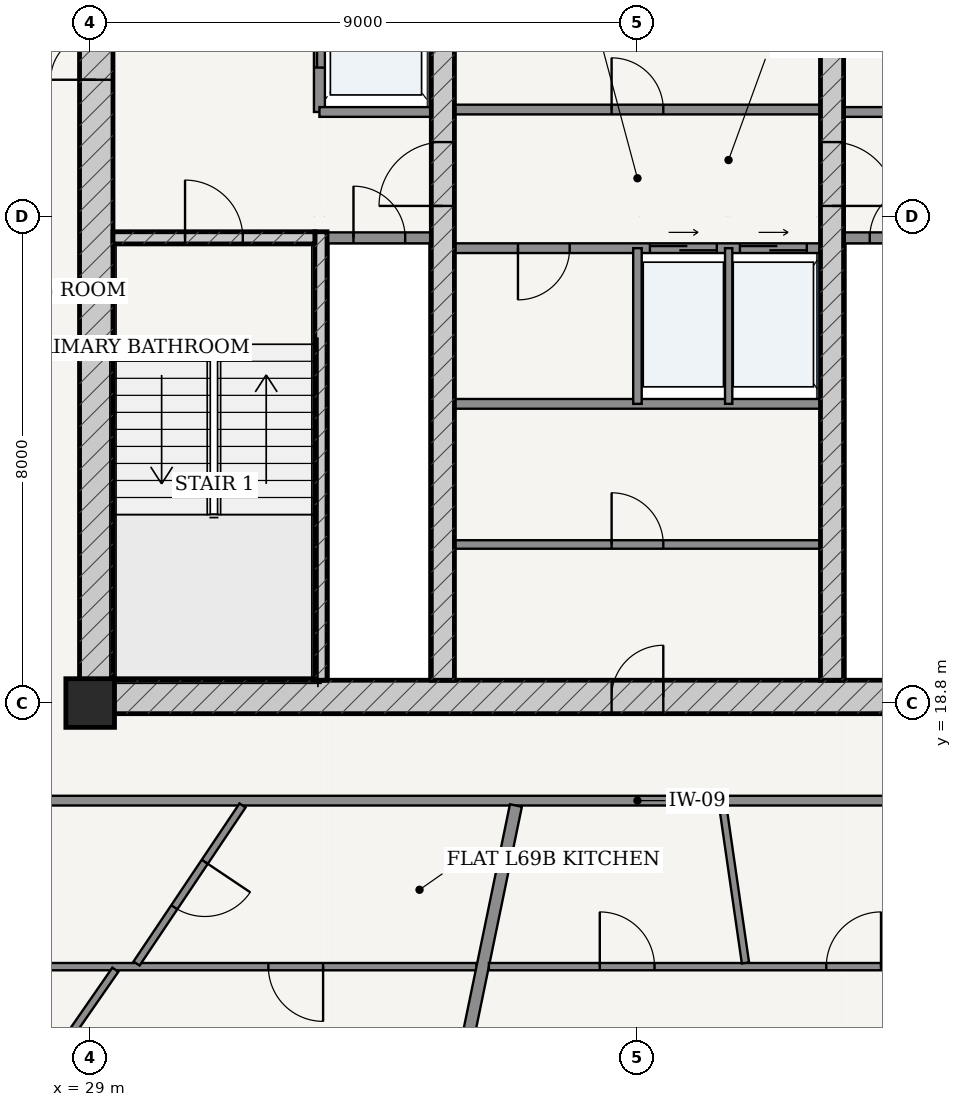
"""IFC4 building model, lengths in metres.
Left out: names, types, materials, properties, quantities, classifications, styles, units other than length and angle.
Written with IfcOpenShell. Run it as: python <this file> out.ifc"""

import sys

from ifc_helpers import new_model, si_unit, direction, frame, frame_2d, origin, origin_2d, place, context, subcontext, project, spatial, rectangle, extrude, source, transform, mapped, element, fill, save


model = new_model("IFC4")
c1 = context("Model", 3, precision=1e-05, world=origin(), true_north=direction((-0.2419218956, 0.970295726276)))
c2 = subcontext(c1, "Body", "Model", "MODEL_VIEW")
j1 = project(units=[si_unit("LENGTHUNIT", "METRE"), si_unit("PLANEANGLEUNIT", "RADIAN")], contexts=[c1])
p1 = place(None, origin())
s1 = spatial("IfcSite", under=j1, at=p1, CompositionType="ELEMENT")
p2 = place(p1, origin())
s2 = spatial("IfcBuilding", under=s1, at=p2, CompositionType="ELEMENT")
p3 = place(p2, frame((0.0, 0.0, 263.2)))
s3 = spatial("IfcBuildingStorey", under=s2, at=p3, CompositionType="ELEMENT", Elevation=263.2)
p4 = place(p3, frame((29.0, 18.8, 0.0), z_axis=(0.0, 0.0, 1.0), x_axis=(1.0, 0.0, 0.0)))
e1 = element("IfcColumn", 1, at=p4, inside=s3, PredefinedType="COLUMN", context=c2, shape_type="SweptSolid", body=[
    extrude(rectangle(XDim=0.8, YDim=0.8, at=origin_2d()), origin(), (0.0, 0.0, 1.0), 3.75),
])
p5 = place(p3, frame((28.825, 18.9, 0.0), z_axis=(0.0, 0.0, 1.0), x_axis=(1.0, 0.0, 0.0)))
e2 = element("IfcWall", 2, at=p5, inside=s3, PredefinedType="SHEAR", context=c2, shape_type="SweptSolid", body=[
    extrude(rectangle(XDim=18.35, YDim=0.55, at=frame_2d((9.175, 0.0))), origin(), (0.0, 0.0, 1.0), 3.49),
])
p6 = place(p5, frame((8.75, 0.0, 0.0)))
e3 = element("IfcOpeningElement", 3, at=p6, cuts=e2, PredefinedType="OPENING", context=c2, shape_type="SweptSolid", body=[
    extrude(rectangle(XDim=0.85, YDim=2.1, at=frame_2d((0.425, 1.05))), frame((0.0, 0.285, 0.0), z_axis=(0.0, -1.0, 0.0), x_axis=(1.0, 0.0, 0.0)), (0.0, 0.0, 1.0), 0.57),
])
p7 = place(p3, frame((29.1, 19.175, 0.0), z_axis=(0.0, 0.0, 1.0), x_axis=(0.0, 1.0, 0.0)))
e4 = element("IfcWall", 4, at=p7, inside=s3, PredefinedType="SHEAR", context=c2, shape_type="SweptSolid", body=[
    extrude(rectangle(XDim=15.25, YDim=0.55, at=frame_2d((7.625, 0.0))), origin(), (0.0, 0.0, 1.0), 3.49),
])
p8 = place(p7, frame((9.875, 0.0, 0.0)))
e5 = element("IfcOpeningElement", 5, at=p8, cuts=e4, PredefinedType="OPENING", context=c2, shape_type="SweptSolid", body=[
    extrude(rectangle(XDim=1.5, YDim=2.2, at=frame_2d((0.75, 1.1))), frame((0.0, 0.285, 0.0), z_axis=(0.0, -1.0, 0.0), x_axis=(1.0, 0.0, 0.0)), (0.0, 0.0, 1.0), 0.57),
])
p9 = place(p3, frame((32.795, 19.175, 0.0), z_axis=(0.0, 0.0, 1.0), x_axis=(0.0, 1.0, 0.0)))
e6 = element("IfcWall", 6, at=p9, inside=s3, PredefinedType="SOLIDWALL", context=c2, shape_type="SweptSolid", body=[
    extrude(rectangle(XDim=7.375, YDim=0.2, at=frame_2d((3.688, 0.0))), origin(), (0.0, 0.0, 1.0), 3.49),
])
p10 = place(p3, frame((29.375, 26.45, 0.0), z_axis=(0.0, 0.0, 1.0), x_axis=(1.0, 0.0, 0.0)))
e7 = element("IfcWall", 7, at=p10, inside=s3, PredefinedType="SOLIDWALL", context=c2, shape_type="SweptSolid", body=[
    extrude(rectangle(XDim=3.32, YDim=0.2, at=frame_2d((1.66, 0.0))), origin(), (0.0, 0.0, 1.0), 3.49),
])
p11 = place(p10, frame((1.185, 0.0, 0.0)))
e8 = element("IfcOpeningElement", 8, at=p11, cuts=e7, PredefinedType="OPENING", context=c2, shape_type="SweptSolid", body=[
    extrude(rectangle(XDim=0.95, YDim=2.15, at=frame_2d((0.475, 1.075))), frame((0.0, 0.11, 0.0), z_axis=(0.0, -1.0, 0.0), x_axis=(1.0, 0.0, 0.0)), (0.0, 0.0, 1.0), 0.22),
])
p12 = place(p3, frame((34.8, 19.175, 0.0), z_axis=(0.0, 0.0, 1.0), x_axis=(0.0, 1.0, 0.0)))
e9 = element("IfcWall", 9, at=p12, inside=s3, PredefinedType="SHEAR", context=c2, shape_type="SweptSolid", body=[
    extrude(rectangle(XDim=15.25, YDim=0.38, at=frame_2d((7.625, 0.0))), origin(), (0.0, 0.0, 1.0), 3.49),
])
p13 = place(p12, frame((7.8, 0.0, 0.0)))
e10 = element("IfcOpeningElement", 10, at=p13, cuts=e9, PredefinedType="OPENING", context=c2, shape_type="SweptSolid", body=[
    extrude(rectangle(XDim=1.05, YDim=2.15, at=frame_2d((0.525, 1.075))), frame((0.0, 0.2, 0.0), z_axis=(0.0, -1.0, 0.0), x_axis=(1.0, 0.0, 0.0)), (0.0, 0.0, 1.0), 0.4),
])
p14 = place(p3, frame((41.2, 19.175, 0.0), z_axis=(0.0, 0.0, 1.0), x_axis=(0.0, 1.0, 0.0)))
e11 = element("IfcWall", 11, at=p14, inside=s3, PredefinedType="SHEAR", context=c2, shape_type="SweptSolid", body=[
    extrude(rectangle(XDim=15.25, YDim=0.38, at=frame_2d((7.625, 0.0))), origin(), (0.0, 0.0, 1.0), 3.49),
])
p15 = place(p14, frame((7.8, 0.0, 0.0)))
e12 = element("IfcOpeningElement", 12, at=p15, cuts=e11, PredefinedType="OPENING", context=c2, shape_type="SweptSolid", body=[
    extrude(rectangle(XDim=1.05, YDim=2.15, at=frame_2d((0.525, 1.075))), frame((0.0, 0.2, 0.0), z_axis=(0.0, -1.0, 0.0), x_axis=(1.0, 0.0, 0.0)), (0.0, 0.0, 1.0), 0.4),
])
p16 = place(p3, frame((32.9, 26.45, 0.0), z_axis=(0.0, 0.0, 1.0), x_axis=(1.0, 0.0, 0.0)))
e13 = element("IfcWall", 13, at=p16, inside=s3, PredefinedType="PARTITIONING", context=c2, shape_type="SweptSolid", body=[
    extrude(rectangle(XDim=1.71, YDim=0.18, at=frame_2d((0.855, 0.0))), origin(), (0.0, 0.0, 1.0), 3.49),
])
p17 = place(p16, frame((0.43, 0.0, 0.0)))
e14 = element("IfcOpeningElement", 14, at=p17, cuts=e13, PredefinedType="OPENING", context=c2, shape_type="SweptSolid", body=[
    extrude(rectangle(XDim=0.85, YDim=2.1, at=frame_2d((0.425, 1.05))), frame((0.0, 0.1, 0.0), z_axis=(0.0, -1.0, 0.0), x_axis=(1.0, 0.0, 0.0)), (0.0, 0.0, 1.0), 0.2),
])
p18 = place(p3, frame((41.39, 26.45, 0.0), z_axis=(0.0, 0.0, 1.0), x_axis=(1.0, 0.0, 0.0)))
e15 = element("IfcWall", 15, at=p18, inside=s3, PredefinedType="PARTITIONING", context=c2, shape_type="SweptSolid", body=[
    extrude(rectangle(XDim=1.71, YDim=0.18, at=frame_2d((0.855, 0.0))), origin(), (0.0, 0.0, 1.0), 3.49),
])
p19 = place(p18, frame((0.43, 0.0, 0.0)))
e16 = element("IfcOpeningElement", 16, at=p19, cuts=e15, PredefinedType="OPENING", context=c2, shape_type="SweptSolid", body=[
    extrude(rectangle(XDim=0.85, YDim=2.1, at=frame_2d((0.425, 1.05))), frame((0.0, 0.1, 0.0), z_axis=(0.0, -1.0, 0.0), x_axis=(1.0, 0.0, 0.0)), (0.0, 0.0, 1.0), 0.2),
])
p20 = place(p3, frame((32.77, 28.52, 0.0), z_axis=(0.0, 0.0, 1.0), x_axis=(0.0, 1.0, 0.0)))
e17 = element("IfcWall", 17, at=p20, inside=s3, PredefinedType="PARTITIONING", context=c2, shape_type="SweptSolid", body=[
    extrude(rectangle(XDim=5.905, YDim=0.18, at=frame_2d((2.953, 0.0))), origin(), (0.0, 0.0, 1.0), 3.49),
])
p21 = place(p20, frame((3.655, 0.0, 0.0)))
e18 = element("IfcOpeningElement", 18, at=p21, cuts=e17, PredefinedType="OPENING", context=c2, shape_type="SweptSolid", body=[
    extrude(rectangle(XDim=1.15, YDim=2.2, at=frame_2d((0.575, 1.1))), frame((0.0, 0.1, 0.0), z_axis=(0.0, -1.0, 0.0), x_axis=(1.0, 0.0, 0.0)), (0.0, 0.0, 1.0), 0.2),
])
p22 = place(p20, frame((0.73, 0.0, 0.0)))
e19 = element("IfcOpeningElement", 19, at=p22, cuts=e17, PredefinedType="OPENING", context=c2, shape_type="SweptSolid", body=[
    extrude(rectangle(XDim=1.2, YDim=2.25, at=frame_2d((0.6, 1.125))), frame((0.0, 0.1, 0.0), z_axis=(0.0, -1.0, 0.0), x_axis=(1.0, 0.0, 0.0)), (0.0, 0.0, 1.0), 0.2),
])
for number, where, z_axis, x_axis in (
    (20, (32.77, 28.52, 0.0), (0.0, 0.0, 1.0), (1.0, 0.0, 0.0)),
    (21, (41.39, 28.52, 0.0), (0.0, 0.0, 1.0), (1.0, 0.0, 0.0)),
):
    element("IfcWall", number, at=place(p3, frame(where, z_axis=z_axis, x_axis=x_axis)), inside=s3, PredefinedType="PARTITIONING", context=c2, shape_type="SweptSolid", body=[
        extrude(rectangle(XDim=1.84, YDim=0.16, at=frame_2d((0.92, 0.0))), origin(), (0.0, 0.0, 1.0), 3.49),
    ])
p23 = place(p3, frame((34.99, 28.56, 0.0), z_axis=(0.0, 0.0, 1.0), x_axis=(1.0, 0.0, 0.0)))
e22 = element("IfcWall", 22, at=p23, inside=s3, PredefinedType="PARTITIONING", context=c2, shape_type="SweptSolid", body=[
    extrude(rectangle(XDim=6.02, YDim=0.16, at=frame_2d((3.01, 0.0))), origin(), (0.0, 0.0, 1.0), 3.49),
])
p24 = place(p23, frame((2.585, 0.0, 0.0)))
e23 = element("IfcOpeningElement", 23, at=p24, cuts=e22, PredefinedType="OPENING", context=c2, shape_type="SweptSolid", body=[
    extrude(rectangle(XDim=0.85, YDim=2.1, at=frame_2d((0.425, 1.05))), frame((0.0, 0.09, 0.0), z_axis=(0.0, -1.0, 0.0), x_axis=(1.0, 0.0, 0.0)), (0.0, 0.0, 1.0), 0.18),
])
p25 = place(p3, frame((34.99, 26.28, 0.0), z_axis=(0.0, 0.0, 1.0), x_axis=(1.0, 0.0, 0.0)))
e24 = element("IfcWall", 24, at=p25, inside=s3, PredefinedType="PARTITIONING", context=c2, shape_type="SweptSolid", body=[
    extrude(rectangle(XDim=6.02, YDim=0.16, at=frame_2d((3.01, 0.0))), origin(), (0.0, 0.0, 1.0), 3.49),
])
p26 = place(p25, frame((1.045, 0.0, 0.0)))
e25 = element("IfcOpeningElement", 25, at=p26, cuts=e24, PredefinedType="OPENING", context=c2, shape_type="SweptSolid", body=[
    extrude(rectangle(XDim=0.85, YDim=2.1, at=frame_2d((0.425, 1.05))), frame((0.0, 0.09, 0.0), z_axis=(0.0, -1.0, 0.0), x_axis=(1.0, 0.0, 0.0)), (0.0, 0.0, 1.0), 0.18),
])
p27 = place(p25, frame((3.215, 0.0, 0.0)))
e26 = element("IfcOpeningElement", 26, at=p27, cuts=e24, PredefinedType="OPENING", context=c2, shape_type="SweptSolid", body=[
    extrude(rectangle(XDim=1.1, YDim=2.2, at=frame_2d((0.55, 1.1))), frame((0.0, 0.09, 0.0), z_axis=(0.0, -1.0, 0.0), x_axis=(1.0, 0.0, 0.0)), (0.0, 0.0, 1.0), 0.18),
])
p28 = place(p25, frame((4.695, 0.0, 0.0)))
e27 = element("IfcOpeningElement", 27, at=p28, cuts=e24, PredefinedType="OPENING", context=c2, shape_type="SweptSolid", body=[
    extrude(rectangle(XDim=1.1, YDim=2.2, at=frame_2d((0.55, 1.1))), frame((0.0, 0.09, 0.0), z_axis=(0.0, -1.0, 0.0), x_axis=(1.0, 0.0, 0.0)), (0.0, 0.0, 1.0), 0.18),
])
p29 = place(p3, frame((34.99, 23.72, 0.0), z_axis=(0.0, 0.0, 1.0), x_axis=(1.0, 0.0, 0.0)))
e28 = element("IfcWall", 28, at=p29, inside=s3, PredefinedType="PARTITIONING", context=c2, shape_type="SweptSolid", body=[
    extrude(rectangle(XDim=6.02, YDim=0.16, at=frame_2d((3.01, 0.0))), origin(), (0.0, 0.0, 1.0), 3.49),
])
p30 = place(p3, frame((38.0, 23.72, 0.0), z_axis=(0.0, 0.0, 1.0), x_axis=(0.0, 1.0, 0.0)))
e29 = element("IfcWall", 29, at=p30, inside=s3, PredefinedType="PARTITIONING", context=c2, shape_type="SweptSolid", body=[
    extrude(rectangle(XDim=2.56, YDim=0.14, at=frame_2d((1.28, 0.0))), origin(), (0.0, 0.0, 1.0), 3.49),
])
p31 = place(p3, frame((39.5, 23.72, 0.0), z_axis=(0.0, 0.0, 1.0), x_axis=(0.0, 1.0, 0.0)))
e30 = element("IfcWall", 30, at=p31, inside=s3, PredefinedType="PARTITIONING", context=c2, shape_type="SweptSolid", body=[
    extrude(rectangle(XDim=2.56, YDim=0.12, at=frame_2d((1.28, 0.0))), origin(), (0.0, 0.0, 1.0), 3.49),
])
p32 = place(p3, frame((34.99, 21.407, 0.0), z_axis=(0.0, 0.0, 1.0), x_axis=(1.0, 0.0, 0.0)))
e31 = element("IfcWall", 31, at=p32, inside=s3, PredefinedType="PARTITIONING", context=c2, shape_type="SweptSolid", body=[
    extrude(rectangle(XDim=6.02, YDim=0.14, at=frame_2d((3.01, 0.0))), origin(), (0.0, 0.0, 1.0), 3.49),
])
p33 = place(p32, frame((2.585, 0.0, 0.0)))
e32 = element("IfcOpeningElement", 32, at=p33, cuts=e31, PredefinedType="OPENING", context=c2, shape_type="SweptSolid", body=[
    extrude(rectangle(XDim=0.85, YDim=2.1, at=frame_2d((0.425, 1.05))), frame((0.0, 0.08, 0.0), z_axis=(0.0, -1.0, 0.0), x_axis=(1.0, 0.0, 0.0)), (0.0, 0.0, 1.0), 0.16),
])
p34 = place(p3, frame((26.895, 17.195, 0.0), z_axis=(0.0, 0.0, 1.0), x_axis=(1.0, 0.0, 0.0)))
e33 = element("IfcWall", 33, at=p34, inside=s3, PredefinedType="PARTITIONING", context=c2, shape_type="SweptSolid", body=[
    extrude(rectangle(XDim=22.21, YDim=0.16, at=frame_2d((11.105, 0.0))), origin(), (0.0, 0.0, 1.0), 3.015),
])
p35 = place(p3, frame((35.353, 14.465, 0.0), z_axis=(0.0, 0.0, 1.0), x_axis=(-1.0, 0.0, 0.0)))
e34 = element("IfcWall", 34, at=p35, inside=s3, PredefinedType="PARTITIONING", context=c2, shape_type="SweptSolid", body=[
    extrude(rectangle(XDim=11.188, YDim=0.12, at=frame_2d((5.594, 0.0))), origin(), (0.0, 0.0, 1.0), 3.015),
])
p36 = place(p35, frame((2.522, 0.0, 0.0)))
e35 = element("IfcOpeningElement", 35, at=p36, cuts=e34, PredefinedType="OPENING", context=c2, shape_type="SweptSolid", body=[
    extrude(rectangle(XDim=0.9, YDim=2.15, at=frame_2d((0.45, 1.075))), frame((0.0, 0.07, 0.0), z_axis=(0.0, -1.0, 0.0), x_axis=(1.0, 0.0, 0.0)), (0.0, 0.0, 1.0), 0.14),
])
p37 = place(p3, frame((29.414, 14.414, 0.0), z_axis=(0.0, 0.0, 1.0), x_axis=(-0.569657021681, -0.821882520589, 0.0)))
e36 = element("IfcWall", 36, at=p37, inside=s3, PredefinedType="PARTITIONING", context=c2, shape_type="SweptSolid", body=[
    extrude(rectangle(XDim=3.748, YDim=0.12, at=frame_2d((1.874, 0.0))), origin(), (0.0, 0.0, 1.0), 3.015),
])
p38 = place(p3, frame((31.505, 17.115, 0.0), z_axis=(0.0, 0.0, 1.0), x_axis=(-0.557003057019, -0.83051044212, 0.0)))
e37 = element("IfcWall", 37, at=p38, inside=s3, PredefinedType="PARTITIONING", context=c2, shape_type="SweptSolid", body=[
    extrude(rectangle(XDim=3.129, YDim=0.12, at=frame_2d((1.564, 0.0))), origin(), (0.0, 0.0, 1.0), 3.209),
])
p39 = place(p38, frame((1.114, 0.0, 0.0)))
e38 = element("IfcOpeningElement", 38, at=p39, cuts=e37, PredefinedType="OPENING", context=c2, shape_type="SweptSolid", body=[
    extrude(rectangle(XDim=0.9, YDim=2.15, at=frame_2d((0.45, 1.075))), frame((0.0, 0.07, 0.0), z_axis=(0.0, -1.0, 0.0), x_axis=(1.0, 0.0, 0.0)), (0.0, 0.0, 1.0), 0.14),
])
p40 = place(p3, frame((36.001, 17.115, 0.0), z_axis=(0.0, 0.0, 1.0), x_axis=(-0.202108543081, -0.979363128167, 0.0)))
e39 = element("IfcWall", 39, at=p40, inside=s3, PredefinedType="PARTITIONING", context=c2, shape_type="SweptSolid", body=[
    extrude(rectangle(XDim=8.739, YDim=0.2, at=frame_2d((4.369, 0.0))), origin(), (0.0, 0.0, 1.0), 3.015),
])
p41 = place(p3, frame((51.835, 14.465, 0.0), z_axis=(0.0, 0.0, 1.0), x_axis=(-1.0, 0.0, 0.0)))
e40 = element("IfcWall", 40, at=p41, inside=s3, PredefinedType="PARTITIONING", context=c2, shape_type="SweptSolid", body=[
    extrude(rectangle(XDim=16.278, YDim=0.12, at=frame_2d((8.139, 0.0))), origin(), (0.0, 0.0, 1.0), 3.015),
])
p42 = place(p41, frame((9.83, 0.0, 0.0)))
e41 = element("IfcOpeningElement", 41, at=p42, cuts=e40, PredefinedType="OPENING", context=c2, shape_type="SweptSolid", body=[
    extrude(rectangle(XDim=0.9, YDim=2.15, at=frame_2d((0.45, 1.075))), frame((0.0, 0.07, 0.0), z_axis=(0.0, -1.0, 0.0), x_axis=(1.0, 0.0, 0.0)), (0.0, 0.0, 1.0), 0.14),
])
p43 = place(p41, frame((13.554, 0.0, 0.0)))
e42 = element("IfcOpeningElement", 42, at=p43, cuts=e40, PredefinedType="OPENING", context=c2, shape_type="SweptSolid", body=[
    extrude(rectangle(XDim=0.9, YDim=2.15, at=frame_2d((0.45, 1.075))), frame((0.0, 0.07, 0.0), z_axis=(0.0, -1.0, 0.0), x_axis=(1.0, 0.0, 0.0)), (0.0, 0.0, 1.0), 0.14),
])
p44 = place(p3, frame((39.402, 17.115, 0.0), z_axis=(0.0, 0.0, 1.0), x_axis=(0.143185278857, -0.989695900728, 0.0)))
e43 = element("IfcWall", 43, at=p44, inside=s3, PredefinedType="PARTITIONING", context=c2, shape_type="SweptSolid", body=[
    extrude(rectangle(XDim=2.615, YDim=0.12, at=frame_2d((1.308, 0.0))), origin(), (0.0, 0.0, 1.0), 3.49),
])
m1 = source(origin(), c2, "Body", "SweptSolid", [
    extrude(rectangle(XDim=1.5, YDim=2.2, at=frame_2d((0.75, 1.1))), frame((0.0, 0.025, 0.0), z_axis=(0.0, -1.0, 0.0), x_axis=(1.0, 0.0, 0.0)), (0.0, 0.0, 1.0), 0.05),
])
p45 = place(p8, origin())
e44 = element("IfcDoor", 44, at=p45, inside=s3, OperationType="DOUBLE_DOOR_SINGLE_SWING", PredefinedType="DOOR", context=c2, shape_type="MappedRepresentation", body=[
    mapped(m1, transform((0.0, 0.0, 0.0), scale=1.0)),
])
fill(e5, e44)
m2 = source(origin(), c2, "Body", "SweptSolid", [
    extrude(rectangle(XDim=1.05, YDim=2.15, at=frame_2d((0.525, 1.075))), frame((0.0, 0.025, 0.0), z_axis=(0.0, -1.0, 0.0), x_axis=(1.0, 0.0, 0.0)), (0.0, 0.0, 1.0), 0.05),
])
p46 = place(p13, origin())
e45 = element("IfcDoor", 45, at=p46, inside=s3, OperationType="SINGLE_SWING_LEFT", PredefinedType="DOOR", context=c2, shape_type="MappedRepresentation", body=[
    mapped(m2, transform((0.0, 0.0, 0.0), scale=1.0)),
])
fill(e10, e45)
p47 = place(p15, frame((1.05, 0.0, 0.0), z_axis=(0.0, 0.0, 1.0), x_axis=(-1.0, 0.0, 0.0)))
e46 = element("IfcDoor", 46, at=p47, inside=s3, OperationType="SINGLE_SWING_RIGHT", PredefinedType="DOOR", context=c2, shape_type="MappedRepresentation", body=[
    mapped(m2, transform((0.0, 0.0, 0.0), scale=1.0)),
])
fill(e12, e46)
m3 = source(origin(), c2, "Body", "SweptSolid", [
    extrude(rectangle(XDim=0.95, YDim=2.15, at=frame_2d((0.475, 1.075))), frame((0.0, 0.025, 0.0), z_axis=(0.0, -1.0, 0.0), x_axis=(1.0, 0.0, 0.0)), (0.0, 0.0, 1.0), 0.05),
])
p48 = place(p11, origin())
e47 = element("IfcDoor", 47, at=p48, inside=s3, OperationType="SINGLE_SWING_LEFT", PredefinedType="DOOR", context=c2, shape_type="MappedRepresentation", body=[
    mapped(m3, transform((0.0, 0.0, 0.0), scale=1.0)),
])
fill(e8, e47)
m4 = source(origin(), c2, "Body", "SweptSolid", [
    extrude(rectangle(XDim=0.85, YDim=2.1, at=frame_2d((0.425, 1.05))), frame((0.0, 0.025, 0.0), z_axis=(0.0, -1.0, 0.0), x_axis=(1.0, 0.0, 0.0)), (0.0, 0.0, 1.0), 0.05),
])
p49 = place(p17, origin())
e48 = element("IfcDoor", 48, at=p49, inside=s3, OperationType="SINGLE_SWING_LEFT", PredefinedType="DOOR", context=c2, shape_type="MappedRepresentation", body=[
    mapped(m4, transform((0.0, 0.0, 0.0), scale=1.0)),
])
fill(e14, e48)
p50 = place(p19, origin())
e49 = element("IfcDoor", 49, at=p50, inside=s3, OperationType="SINGLE_SWING_RIGHT", PredefinedType="DOOR", context=c2, shape_type="MappedRepresentation", body=[
    mapped(m4, transform((0.0, 0.0, 0.0), scale=1.0)),
])
fill(e16, e49)
p51 = place(p24, origin())
e50 = element("IfcDoor", 50, at=p51, inside=s3, OperationType="SINGLE_SWING_LEFT", PredefinedType="DOOR", context=c2, shape_type="MappedRepresentation", body=[
    mapped(m4, transform((0.0, 0.0, 0.0), scale=1.0)),
])
fill(e23, e50)
p52 = place(p26, frame((0.85, 0.0, 0.0), z_axis=(0.0, 0.0, 1.0), x_axis=(-1.0, 0.0, 0.0)))
e51 = element("IfcDoor", 51, at=p52, inside=s3, OperationType="SINGLE_SWING_RIGHT", PredefinedType="DOOR", context=c2, shape_type="MappedRepresentation", body=[
    mapped(m4, transform((0.0, 0.0, 0.0), scale=1.0)),
])
fill(e25, e51)
p53 = place(p6, origin())
e52 = element("IfcDoor", 52, at=p53, inside=s3, OperationType="SINGLE_SWING_RIGHT", PredefinedType="DOOR", context=c2, shape_type="MappedRepresentation", body=[
    mapped(m4, transform((0.0, 0.0, 0.0), scale=1.0)),
])
fill(e3, e52)
p54 = place(p33, origin())
e53 = element("IfcDoor", 53, at=p54, inside=s3, OperationType="SINGLE_SWING_LEFT", PredefinedType="DOOR", context=c2, shape_type="MappedRepresentation", body=[
    mapped(m4, transform((0.0, 0.0, 0.0), scale=1.0)),
])
fill(e32, e53)
m5 = source(origin(), c2, "Body", "SweptSolid", [
    extrude(rectangle(XDim=1.2, YDim=2.25, at=frame_2d((0.6, 1.125))), frame((0.0, 0.025, 0.0), z_axis=(0.0, -1.0, 0.0), x_axis=(1.0, 0.0, 0.0)), (0.0, 0.0, 1.0), 0.05),
])
p55 = place(p22, origin())
e54 = element("IfcDoor", 54, at=p55, inside=s3, OperationType="DOUBLE_DOOR_SLIDING", PredefinedType="DOOR", context=c2, shape_type="MappedRepresentation", body=[
    mapped(m5, transform((0.0, 0.0, 0.0), scale=1.0)),
])
fill(e19, e54)
m6 = source(origin(), c2, "Body", "SweptSolid", [
    extrude(rectangle(XDim=1.1, YDim=2.2, at=frame_2d((0.55, 1.1))), frame((0.0, 0.025, 0.0), z_axis=(0.0, -1.0, 0.0), x_axis=(1.0, 0.0, 0.0)), (0.0, 0.0, 1.0), 0.05),
])
p56 = place(p27, origin())
e55 = element("IfcDoor", 55, at=p56, inside=s3, OperationType="DOUBLE_DOOR_SLIDING", PredefinedType="DOOR", context=c2, shape_type="MappedRepresentation", body=[
    mapped(m6, transform((0.0, 0.0, 0.0), scale=1.0)),
])
fill(e26, e55)
p57 = place(p28, origin())
e56 = element("IfcDoor", 56, at=p57, inside=s3, OperationType="DOUBLE_DOOR_SLIDING", PredefinedType="DOOR", context=c2, shape_type="MappedRepresentation", body=[
    mapped(m6, transform((0.0, 0.0, 0.0), scale=1.0)),
])
fill(e27, e56)
m7 = source(origin(), c2, "Body", "SweptSolid", [
    extrude(rectangle(XDim=0.9, YDim=2.15, at=frame_2d((0.45, 1.075))), frame((0.0, 0.025, 0.0), z_axis=(0.0, -1.0, 0.0), x_axis=(1.0, 0.0, 0.0)), (0.0, 0.0, 1.0), 0.05),
])
p58 = place(p39, origin())
e57 = element("IfcDoor", 57, at=p58, inside=s3, OperationType="SINGLE_SWING_LEFT", PredefinedType="DOOR", context=c2, shape_type="MappedRepresentation", body=[
    mapped(m7, transform((0.0, 0.0, 0.0), scale=1.0)),
])
fill(e38, e57)
p59 = place(p36, origin())
e58 = element("IfcDoor", 58, at=p59, inside=s3, OperationType="SINGLE_SWING_LEFT", PredefinedType="DOOR", context=c2, shape_type="MappedRepresentation", body=[
    mapped(m7, transform((0.0, 0.0, 0.0), scale=1.0)),
])
fill(e35, e58)
p60 = place(p42, frame((0.9, 0.0, 0.0), z_axis=(0.0, 0.0, 1.0), x_axis=(-1.0, 0.0, 0.0)))
e59 = element("IfcDoor", 59, at=p60, inside=s3, OperationType="SINGLE_SWING_RIGHT", PredefinedType="DOOR", context=c2, shape_type="MappedRepresentation", body=[
    mapped(m7, transform((0.0, 0.0, 0.0), scale=1.0)),
])
fill(e41, e59)
p61 = place(p43, frame((0.9, 0.0, 0.0), z_axis=(0.0, 0.0, 1.0), x_axis=(-1.0, 0.0, 0.0)))
e60 = element("IfcDoor", 60, at=p61, inside=s3, OperationType="SINGLE_SWING_LEFT", PredefinedType="DOOR", context=c2, shape_type="MappedRepresentation", body=[
    mapped(m7, transform((0.0, 0.0, 0.0), scale=1.0)),
])
fill(e42, e60)
save(model, sys.argv[1])
